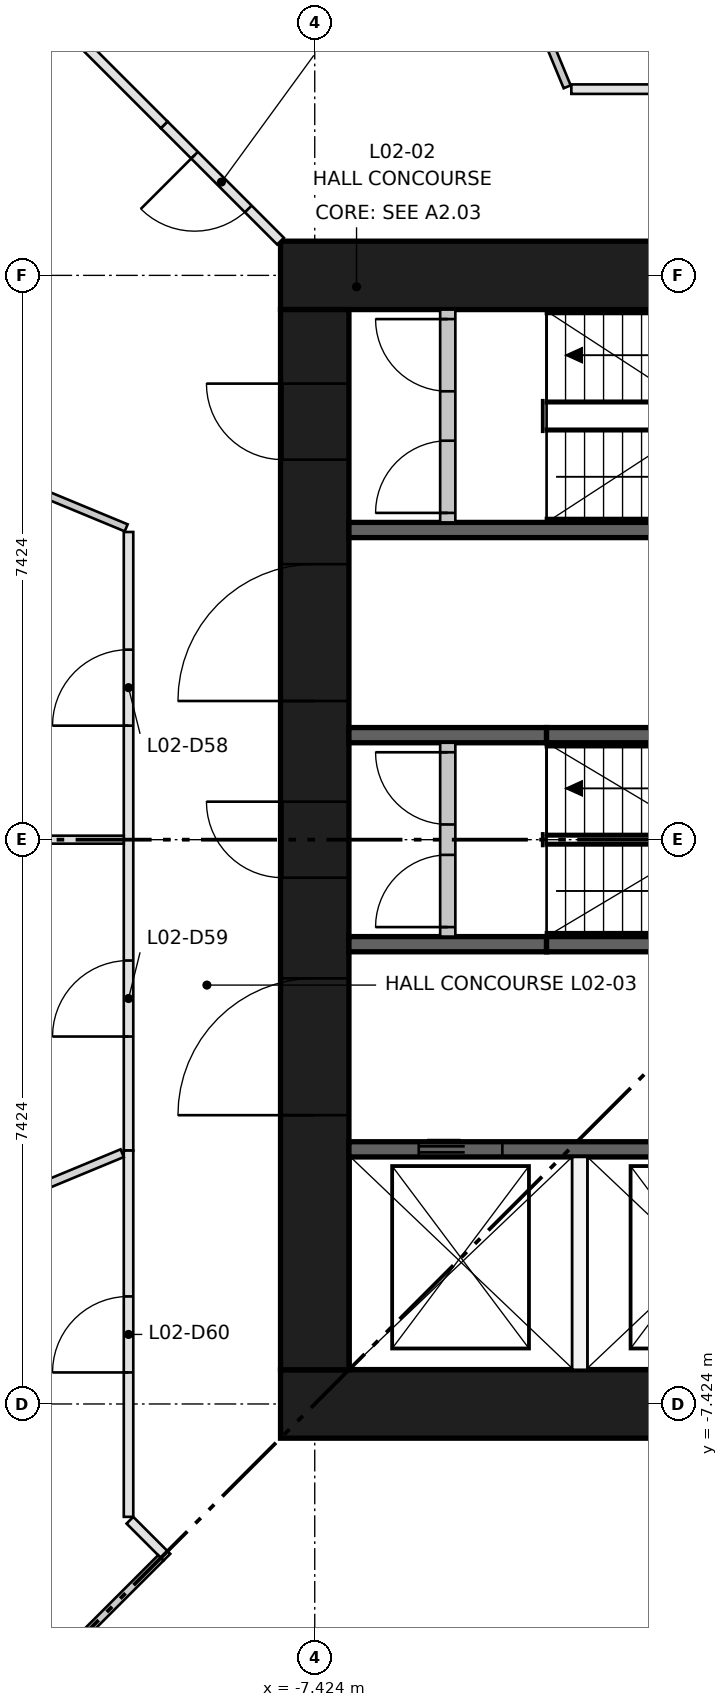
"""IFC4 building model, lengths in metres.
Left out: names, types, materials, properties, quantities, classifications, styles, units other than length and angle.
Written with IfcOpenShell. Run it as: python <this file> out.ifc"""

import sys

from ifc_helpers import new_model, si_unit, direction, frame, frame_2d, origin, place, context, subcontext, project, spatial, rectangle, extrude, element, fill, save


model = new_model("IFC4")
c1 = context("Model", 3, precision=1e-05, world=origin(), true_north=direction((0.0, 1.0)))
c2 = subcontext(c1, "Body", "Model", "MODEL_VIEW")
j1 = project(units=[si_unit("LENGTHUNIT", "METRE"), si_unit("PLANEANGLEUNIT", "RADIAN")], contexts=[c1])
p1 = place(None, origin())
s1 = spatial("IfcSite", under=j1, at=p1, CompositionType="ELEMENT")
p2 = place(p1, origin())
s2 = spatial("IfcBuilding", under=s1, at=p2, CompositionType="ELEMENT")
p3 = place(p2, frame((0.0, 0.0, 9.9)))
s3 = spatial("IfcBuildingStorey", under=s2, at=p3, CompositionType="ELEMENT", Elevation=9.9)
for number, where, z_axis, x_axis in (
    (1, (-7.874, -7.424, 0.0), (0.0, 0.0, 1.0), (1.0, 0.0, 0.0)),
    (2, (-7.874, 7.424, 0.0), (0.0, 0.0, 1.0), (1.0, 0.0, 0.0)),
):
    element("IfcWall", number, at=place(p3, frame(where, z_axis=z_axis, x_axis=x_axis)), inside=s3, PredefinedType="SHEAR", context=c2, shape_type="SweptSolid", body=[
        extrude(rectangle(XDim=15.748, YDim=0.9, at=frame_2d((7.874, 0.0))), origin(), (0.0, 0.0, 1.0), 4.5),
    ])
p4 = place(p3, frame((-7.424, -6.974, 0.0), z_axis=(0.0, 0.0, 1.0), x_axis=(0.0, 1.0, 0.0)))
e3 = element("IfcWall", 3, at=p4, inside=s3, PredefinedType="SHEAR", context=c2, shape_type="SweptSolid", body=[
    extrude(rectangle(XDim=13.948, YDim=0.9, at=frame_2d((6.974, 0.0))), origin(), (0.0, 0.0, 1.0), 4.5),
])
p5 = place(p4, frame((6.474, 0.0, 0.0)))
e4 = element("IfcOpeningElement", 4, at=p5, cuts=e3, PredefinedType="OPENING", context=c2, shape_type="SweptSolid", body=[
    extrude(rectangle(XDim=1.0, YDim=2.1, at=frame_2d((0.5, 1.05))), frame((0.0, 0.46, 0.0), z_axis=(0.0, -1.0, 0.0), x_axis=(1.0, 0.0, 0.0)), (0.0, 0.0, 1.0), 0.92),
])
p6 = place(p4, frame((3.35, 0.0, 0.0)))
e5 = element("IfcOpeningElement", 5, at=p6, cuts=e3, PredefinedType="OPENING", context=c2, shape_type="SweptSolid", body=[
    extrude(rectangle(XDim=1.8, YDim=2.1, at=frame_2d((0.9, 1.05))), frame((0.0, 0.46, 0.0), z_axis=(0.0, -1.0, 0.0), x_axis=(1.0, 0.0, 0.0)), (0.0, 0.0, 1.0), 0.92),
])
p7 = place(p4, frame((8.799, 0.0, 0.0)))
e6 = element("IfcOpeningElement", 6, at=p7, cuts=e3, PredefinedType="OPENING", context=c2, shape_type="SweptSolid", body=[
    extrude(rectangle(XDim=1.8, YDim=2.1, at=frame_2d((0.9, 1.05))), frame((0.0, 0.46, 0.0), z_axis=(0.0, -1.0, 0.0), x_axis=(1.0, 0.0, 0.0)), (0.0, 0.0, 1.0), 0.92),
])
p8 = place(p4, frame((11.974, 0.0, 0.0)))
e7 = element("IfcOpeningElement", 7, at=p8, cuts=e3, PredefinedType="OPENING", context=c2, shape_type="SweptSolid", body=[
    extrude(rectangle(XDim=1.0, YDim=2.1, at=frame_2d((0.5, 1.05))), frame((0.0, 0.46, 0.0), z_axis=(0.0, -1.0, 0.0), x_axis=(1.0, 0.0, 0.0)), (0.0, 0.0, 1.0), 0.92),
])
p9 = place(p3, frame((-6.974, -4.074, 0.0), z_axis=(0.0, 0.0, 1.0), x_axis=(1.0, 0.0, 0.0)))
e8 = element("IfcWall", 8, at=p9, inside=s3, PredefinedType="SHEAR", context=c2, shape_type="SweptSolid", body=[
    extrude(rectangle(XDim=13.948, YDim=0.2, at=frame_2d((6.974, 0.0))), origin(), (0.0, 0.0, 1.0), 4.1),
])
p10 = place(p9, frame((0.918, 0.0, 0.0)))
e9 = element("IfcOpeningElement", 9, at=p10, cuts=e8, PredefinedType="OPENING", context=c2, shape_type="SweptSolid", body=[
    extrude(rectangle(XDim=1.1, YDim=2.1, at=frame_2d((0.55, 1.05))), frame((0.0, 0.11, 0.0), z_axis=(0.0, -1.0, 0.0), x_axis=(1.0, 0.0, 0.0)), (0.0, 0.0, 1.0), 0.22),
])
p11 = place(p9, frame((4.055, 0.0, 0.0)))
e10 = element("IfcOpeningElement", 10, at=p11, cuts=e8, PredefinedType="OPENING", context=c2, shape_type="SweptSolid", body=[
    extrude(rectangle(XDim=1.1, YDim=2.1, at=frame_2d((0.55, 1.05))), frame((0.0, 0.11, 0.0), z_axis=(0.0, -1.0, 0.0), x_axis=(1.0, 0.0, 0.0)), (0.0, 0.0, 1.0), 0.22),
])
p12 = place(p9, frame((6.658, 0.0, 0.0)))
e11 = element("IfcOpeningElement", 11, at=p12, cuts=e8, PredefinedType="OPENING", context=c2, shape_type="SweptSolid", body=[
    extrude(rectangle(XDim=1.0, YDim=2.1, at=frame_2d((0.5, 1.05))), frame((0.0, 0.11, 0.0), z_axis=(0.0, -1.0, 0.0), x_axis=(1.0, 0.0, 0.0)), (0.0, 0.0, 1.0), 0.22),
])
p13 = place(p9, frame((8.627, 0.0, 0.0)))
e12 = element("IfcOpeningElement", 12, at=p13, cuts=e8, PredefinedType="OPENING", context=c2, shape_type="SweptSolid", body=[
    extrude(rectangle(XDim=1.0, YDim=2.1, at=frame_2d((0.5, 1.05))), frame((0.0, 0.11, 0.0), z_axis=(0.0, -1.0, 0.0), x_axis=(1.0, 0.0, 0.0)), (0.0, 0.0, 1.0), 0.22),
])
p14 = place(p9, frame((10.595, 0.0, 0.0)))
e13 = element("IfcOpeningElement", 13, at=p14, cuts=e8, PredefinedType="OPENING", context=c2, shape_type="SweptSolid", body=[
    extrude(rectangle(XDim=1.0, YDim=2.1, at=frame_2d((0.5, 1.05))), frame((0.0, 0.11, 0.0), z_axis=(0.0, -1.0, 0.0), x_axis=(1.0, 0.0, 0.0)), (0.0, 0.0, 1.0), 0.22),
])
p15 = place(p9, frame((12.564, 0.0, 0.0)))
e14 = element("IfcOpeningElement", 14, at=p15, cuts=e8, PredefinedType="OPENING", context=c2, shape_type="SweptSolid", body=[
    extrude(rectangle(XDim=1.0, YDim=2.1, at=frame_2d((0.5, 1.05))), frame((0.0, 0.11, 0.0), z_axis=(0.0, -1.0, 0.0), x_axis=(1.0, 0.0, 0.0)), (0.0, 0.0, 1.0), 0.22),
])
p16 = place(p3, frame((-6.974, 4.074, 0.0), z_axis=(0.0, 0.0, 1.0), x_axis=(1.0, 0.0, 0.0)))
e15 = element("IfcWall", 15, at=p16, inside=s3, PredefinedType="SHEAR", context=c2, shape_type="SweptSolid", body=[
    extrude(rectangle(XDim=6.974, YDim=0.2, at=frame_2d((3.487, 0.0))), origin(), (0.0, 0.0, 1.0), 4.1),
])
p17 = place(p3, frame((-6.974, -1.375, 0.0), z_axis=(0.0, 0.0, 1.0), x_axis=(1.0, 0.0, 0.0)))
e16 = element("IfcWall", 16, at=p17, inside=s3, PredefinedType="SHEAR", context=c2, shape_type="SweptSolid", body=[
    extrude(rectangle(XDim=2.6, YDim=0.2, at=frame_2d((1.3, 0.0))), origin(), (0.0, 0.0, 1.0), 4.1),
])
p18 = place(p3, frame((-4.374, -1.375, 0.0), z_axis=(0.0, 0.0, 1.0), x_axis=(1.0, 0.0, 0.0)))
e17 = element("IfcWall", 17, at=p18, inside=s3, PredefinedType="SHEAR", context=c2, shape_type="SweptSolid", body=[
    extrude(rectangle(XDim=4.374, YDim=0.2, at=frame_2d((2.187, 0.0))), origin(), (0.0, 0.0, 1.0), 4.1),
])
p19 = place(p3, frame((-6.974, 1.375, 0.0), z_axis=(0.0, 0.0, 1.0), x_axis=(1.0, 0.0, 0.0)))
e18 = element("IfcWall", 18, at=p19, inside=s3, PredefinedType="SHEAR", context=c2, shape_type="SweptSolid", body=[
    extrude(rectangle(XDim=2.6, YDim=0.2, at=frame_2d((1.3, 0.0))), origin(), (0.0, 0.0, 1.0), 4.1),
])
p20 = place(p3, frame((-4.374, 1.375, 0.0), z_axis=(0.0, 0.0, 1.0), x_axis=(1.0, 0.0, 0.0)))
e19 = element("IfcWall", 19, at=p20, inside=s3, PredefinedType="SHEAR", context=c2, shape_type="SweptSolid", body=[
    extrude(rectangle(XDim=4.374, YDim=0.2, at=frame_2d((2.187, 0.0))), origin(), (0.0, 0.0, 1.0), 4.1),
])
p21 = place(p3, frame((-3.937, -6.974, 0.0), z_axis=(0.0, 0.0, 1.0), x_axis=(0.0, 1.0, 0.0)))
e20 = element("IfcWall", 20, at=p21, inside=s3, PredefinedType="PARTITIONING", context=c2, shape_type="SweptSolid", body=[
    extrude(rectangle(XDim=2.8, YDim=0.2, at=frame_2d((1.4, 0.0))), origin(), (0.0, 0.0, 1.0), 4.1),
])
p22 = place(p3, frame((-5.674, -1.275, 0.0), z_axis=(0.0, 0.0, 1.0), x_axis=(0.0, 1.0, 0.0)))
e21 = element("IfcWall", 21, at=p22, inside=s3, PredefinedType="PARTITIONING", context=c2, shape_type="SweptSolid", body=[
    extrude(rectangle(XDim=2.55, YDim=0.2, at=frame_2d((1.275, 0.0))), origin(), (0.0, 0.0, 1.0), 4.1),
])
p23 = place(p22, frame((0.125, 0.0, 0.0)))
e22 = element("IfcOpeningElement", 22, at=p23, cuts=e21, PredefinedType="OPENING", context=c2, shape_type="SweptSolid", body=[
    extrude(rectangle(XDim=0.95, YDim=2.1, at=frame_2d((0.475, 1.05))), frame((0.0, 0.11, 0.0), z_axis=(0.0, -1.0, 0.0), x_axis=(1.0, 0.0, 0.0)), (0.0, 0.0, 1.0), 0.22),
])
p24 = place(p22, frame((1.475, 0.0, 0.0)))
e23 = element("IfcOpeningElement", 23, at=p24, cuts=e21, PredefinedType="OPENING", context=c2, shape_type="SweptSolid", body=[
    extrude(rectangle(XDim=0.95, YDim=2.1, at=frame_2d((0.475, 1.05))), frame((0.0, 0.11, 0.0), z_axis=(0.0, -1.0, 0.0), x_axis=(1.0, 0.0, 0.0)), (0.0, 0.0, 1.0), 0.22),
])
p25 = place(p3, frame((-5.674, 4.174, 0.0), z_axis=(0.0, 0.0, 1.0), x_axis=(0.0, 1.0, 0.0)))
e24 = element("IfcWall", 24, at=p25, inside=s3, PredefinedType="PARTITIONING", context=c2, shape_type="SweptSolid", body=[
    extrude(rectangle(XDim=2.8, YDim=0.2, at=frame_2d((1.4, 0.0))), origin(), (0.0, 0.0, 1.0), 4.1),
])
p26 = place(p25, frame((0.125, 0.0, 0.0)))
e25 = element("IfcOpeningElement", 25, at=p26, cuts=e24, PredefinedType="OPENING", context=c2, shape_type="SweptSolid", body=[
    extrude(rectangle(XDim=0.95, YDim=2.1, at=frame_2d((0.475, 1.05))), frame((0.0, 0.11, 0.0), z_axis=(0.0, -1.0, 0.0), x_axis=(1.0, 0.0, 0.0)), (0.0, 0.0, 1.0), 0.22),
])
p27 = place(p25, frame((1.725, 0.0, 0.0)))
e26 = element("IfcOpeningElement", 26, at=p27, cuts=e24, PredefinedType="OPENING", context=c2, shape_type="SweptSolid", body=[
    extrude(rectangle(XDim=0.95, YDim=2.1, at=frame_2d((0.475, 1.05))), frame((0.0, 0.11, 0.0), z_axis=(0.0, -1.0, 0.0), x_axis=(1.0, 0.0, 0.0)), (0.0, 0.0, 1.0), 0.22),
])
p28 = place(p3, frame((-7.874, 7.874, 0.0), z_axis=(0.0, 0.0, 1.0), x_axis=(-0.707106781187, 0.707106781187, 0.0)))
e27 = element("IfcWall", 27, at=p28, inside=s3, PredefinedType="PARTITIONING", context=c2, shape_type="SweptSolid", body=[
    extrude(rectangle(XDim=2.165, YDim=0.125, at=frame_2d((1.082, 0.0))), origin(), (0.0, 0.0, 1.0), 4.1),
])
p29 = place(p28, frame((0.6, 0.0, 0.0)))
e28 = element("IfcOpeningElement", 28, at=p29, cuts=e27, PredefinedType="OPENING", context=c2, shape_type="SweptSolid", body=[
    extrude(rectangle(XDim=1.0, YDim=2.1, at=frame_2d((0.5, 1.05))), frame((0.0, 0.073, 0.0), z_axis=(0.0, -1.0, 0.0), x_axis=(1.0, 0.0, 0.0)), (0.0, 0.0, 1.0), 0.145),
])
p30 = place(p3, frame((-4.048, 9.874, 0.0), z_axis=(0.0, 0.0, 1.0), x_axis=(1.0, 0.0, 0.0)))
e29 = element("IfcWall", 29, at=p30, inside=s3, PredefinedType="PARTITIONING", context=c2, shape_type="SweptSolid", body=[
    extrude(rectangle(XDim=4.048, YDim=0.125, at=frame_2d((2.024, 0.0))), origin(), (0.0, 0.0, 1.0), 4.1),
])
p31 = place(p30, frame((1.5, 0.0, 0.0)))
e30 = element("IfcOpeningElement", 30, at=p31, cuts=e29, PredefinedType="OPENING", context=c2, shape_type="SweptSolid", body=[
    extrude(rectangle(XDim=1.0, YDim=2.1, at=frame_2d((0.5, 1.05))), frame((0.0, 0.073, 0.0), z_axis=(0.0, -1.0, 0.0), x_axis=(1.0, 0.0, 0.0)), (0.0, 0.0, 1.0), 0.145),
])
p32 = place(p3, frame((-9.874, 0.0, 0.0), z_axis=(0.0, 0.0, 1.0), x_axis=(0.0, 1.0, 0.0)))
e31 = element("IfcWall", 31, at=p32, inside=s3, PredefinedType="PARTITIONING", context=c2, shape_type="SweptSolid", body=[
    extrude(rectangle(XDim=4.048, YDim=0.125, at=frame_2d((2.024, 0.0))), origin(), (0.0, 0.0, 1.0), 4.1),
])
p33 = place(p32, frame((1.5, 0.0, 0.0)))
e32 = element("IfcOpeningElement", 32, at=p33, cuts=e31, PredefinedType="OPENING", context=c2, shape_type="SweptSolid", body=[
    extrude(rectangle(XDim=1.0, YDim=2.1, at=frame_2d((0.5, 1.05))), frame((0.0, 0.073, 0.0), z_axis=(0.0, -1.0, 0.0), x_axis=(1.0, 0.0, 0.0)), (0.0, 0.0, 1.0), 0.145),
])
p34 = place(p3, frame((-9.874, -4.09, 0.0), z_axis=(0.0, 0.0, 1.0), x_axis=(0.0, 1.0, 0.0)))
e33 = element("IfcWall", 33, at=p34, inside=s3, PredefinedType="PARTITIONING", context=c2, shape_type="SweptSolid", body=[
    extrude(rectangle(XDim=4.09, YDim=0.125, at=frame_2d((2.045, 0.0))), origin(), (0.0, 0.0, 1.0), 4.1),
])
p35 = place(p34, frame((1.5, 0.0, 0.0)))
e34 = element("IfcOpeningElement", 34, at=p35, cuts=e33, PredefinedType="OPENING", context=c2, shape_type="SweptSolid", body=[
    extrude(rectangle(XDim=1.0, YDim=2.1, at=frame_2d((0.5, 1.05))), frame((0.0, 0.073, 0.0), z_axis=(0.0, -1.0, 0.0), x_axis=(1.0, 0.0, 0.0)), (0.0, 0.0, 1.0), 0.145),
])
p36 = place(p3, frame((-9.874, -8.909, 0.0), z_axis=(0.0, 0.0, 1.0), x_axis=(0.0, 1.0, 0.0)))
e35 = element("IfcWall", 35, at=p36, inside=s3, PredefinedType="PARTITIONING", context=c2, shape_type="SweptSolid", body=[
    extrude(rectangle(XDim=4.819, YDim=0.125, at=frame_2d((2.41, 0.0))), origin(), (0.0, 0.0, 1.0), 4.1),
])
p37 = place(p36, frame((1.9, 0.0, 0.0)))
e36 = element("IfcOpeningElement", 36, at=p37, cuts=e35, PredefinedType="OPENING", context=c2, shape_type="SweptSolid", body=[
    extrude(rectangle(XDim=1.0, YDim=2.1, at=frame_2d((0.5, 1.05))), frame((0.0, 0.073, 0.0), z_axis=(0.0, -1.0, 0.0), x_axis=(1.0, 0.0, 0.0)), (0.0, 0.0, 1.0), 0.145),
])
p38 = place(p3, frame((-9.369, -9.44, 0.0), z_axis=(0.0, 0.0, 1.0), x_axis=(-0.707106781187, 0.707106781187, 0.0)))
e37 = element("IfcWall", 37, at=p38, inside=s3, PredefinedType="PARTITIONING", context=c2, shape_type="SweptSolid", body=[
    extrude(rectangle(XDim=0.688, YDim=0.125, at=frame_2d((0.344, 0.0))), origin(), (0.0, 0.0, 1.0), 4.1),
])
p39 = place(p3, frame((-4.103, 9.905, 0.0), z_axis=(0.0, 0.0, 1.0), x_axis=(-0.38266385981, 0.923887639486, 0.0)))
e38 = element("IfcWall", 38, at=p39, inside=s3, PredefinedType="PARTITIONING", context=c2, shape_type="SweptSolid", body=[
    extrude(rectangle(XDim=4.399, YDim=0.1, at=frame_2d((2.199, 0.0))), origin(), (0.0, 0.0, 1.0), 4.1),
])
p40 = place(p3, frame((-9.405, 9.405, 0.0), z_axis=(0.0, 0.0, 1.0), x_axis=(-0.707106781187, 0.707106781187, 0.0)))
e39 = element("IfcWall", 39, at=p40, inside=s3, PredefinedType="PARTITIONING", context=c2, shape_type="SweptSolid", body=[
    extrude(rectangle(XDim=5.39, YDim=0.125, at=frame_2d((2.695, 0.0))), origin(), (0.0, 0.0, 1.0), 4.1),
])
p41 = place(p3, frame((-9.905, 4.103, 0.0), z_axis=(0.0, 0.0, 1.0), x_axis=(-0.923885444896, 0.382669158294, 0.0)))
e40 = element("IfcWall", 40, at=p41, inside=s3, PredefinedType="PARTITIONING", context=c2, shape_type="SweptSolid", body=[
    extrude(rectangle(XDim=4.099, YDim=0.1, at=frame_2d((2.05, 0.0))), origin(), (0.0, 0.0, 1.0), 4.1),
])
p42 = place(p3, frame((-9.937, 0.0, 0.0), z_axis=(0.0, 0.0, 1.0), x_axis=(-1.0, 0.0, 0.0)))
e41 = element("IfcWall", 41, at=p42, inside=s3, PredefinedType="PARTITIONING", context=c2, shape_type="SweptSolid", body=[
    extrude(rectangle(XDim=4.884, YDim=0.105, at=frame_2d((2.442, 0.0))), origin(), (0.0, 0.0, 1.0), 4.1),
])
p43 = place(p3, frame((-9.958, -4.125, 0.0), z_axis=(0.0, 0.0, 1.0), x_axis=(-0.923875488976, -0.382693194178, 0.0)))
e42 = element("IfcWall", 42, at=p43, inside=s3, PredefinedType="PARTITIONING", context=c2, shape_type="SweptSolid", body=[
    extrude(rectangle(XDim=4.042, YDim=0.11, at=frame_2d((2.021, 0.0))), origin(), (0.0, 0.0, 1.0), 4.1),
])
p44 = place(p3, frame((-13.216, -13.216, 0.0), z_axis=(0.0, 0.0, 1.0), x_axis=(0.707106781187, 0.707106781187, 0.0)))
e43 = element("IfcWall", 43, at=p44, inside=s3, PredefinedType="PARTITIONING", context=c2, shape_type="SweptSolid", body=[
    extrude(rectangle(XDim=5.327, YDim=0.1, at=frame_2d((2.664, 0.0))), origin(), (0.0, 0.0, 1.0), 4.1),
])
p45 = place(p10, origin())
e44 = element("IfcDoor", 44, at=p45, inside=s3, OperationType="DOUBLE_DOOR_SLIDING", PredefinedType="DOOR", context=c2, shape_type="SweptSolid", body=[
    extrude(rectangle(XDim=1.1, YDim=2.1, at=frame_2d((0.55, 1.05))), frame((0.0, 0.025, 0.0), z_axis=(0.0, -1.0, 0.0), x_axis=(1.0, 0.0, 0.0)), (0.0, 0.0, 1.0), 0.05),
])
fill(e9, e44)
p46 = place(p23, origin())
e45 = element("IfcDoor", 45, at=p46, inside=s3, OperationType="SINGLE_SWING_LEFT", PredefinedType="DOOR", context=c2, shape_type="SweptSolid", body=[
    extrude(rectangle(XDim=0.95, YDim=2.1, at=frame_2d((0.475, 1.05))), frame((0.0, 0.025, 0.0), z_axis=(0.0, -1.0, 0.0), x_axis=(1.0, 0.0, 0.0)), (0.0, 0.0, 1.0), 0.05),
])
fill(e22, e45)
p47 = place(p24, origin())
e46 = element("IfcDoor", 46, at=p47, inside=s3, OperationType="SINGLE_SWING_RIGHT", PredefinedType="DOOR", context=c2, shape_type="SweptSolid", body=[
    extrude(rectangle(XDim=0.95, YDim=2.1, at=frame_2d((0.475, 1.05))), frame((0.0, 0.025, 0.0), z_axis=(0.0, -1.0, 0.0), x_axis=(1.0, 0.0, 0.0)), (0.0, 0.0, 1.0), 0.05),
])
fill(e23, e46)
p48 = place(p26, origin())
e47 = element("IfcDoor", 47, at=p48, inside=s3, OperationType="SINGLE_SWING_LEFT", PredefinedType="DOOR", context=c2, shape_type="SweptSolid", body=[
    extrude(rectangle(XDim=0.95, YDim=2.1, at=frame_2d((0.475, 1.05))), frame((0.0, 0.025, 0.0), z_axis=(0.0, -1.0, 0.0), x_axis=(1.0, 0.0, 0.0)), (0.0, 0.0, 1.0), 0.05),
])
fill(e25, e47)
p49 = place(p27, origin())
e48 = element("IfcDoor", 48, at=p49, inside=s3, OperationType="SINGLE_SWING_RIGHT", PredefinedType="DOOR", context=c2, shape_type="SweptSolid", body=[
    extrude(rectangle(XDim=0.95, YDim=2.1, at=frame_2d((0.475, 1.05))), frame((0.0, 0.025, 0.0), z_axis=(0.0, -1.0, 0.0), x_axis=(1.0, 0.0, 0.0)), (0.0, 0.0, 1.0), 0.05),
])
fill(e26, e48)
p50 = place(p5, origin())
e49 = element("IfcDoor", 49, at=p50, inside=s3, OperationType="SINGLE_SWING_RIGHT", PredefinedType="DOOR", context=c2, shape_type="SweptSolid", body=[
    extrude(rectangle(XDim=1.0, YDim=2.1, at=frame_2d((0.5, 1.05))), frame((0.0, 0.45, 0.0), z_axis=(0.0, -1.0, 0.0), x_axis=(1.0, 0.0, 0.0)), (0.0, 0.0, 1.0), 0.05),
])
fill(e4, e49)
p51 = place(p6, origin())
e50 = element("IfcDoor", 50, at=p51, inside=s3, OperationType="DOUBLE_DOOR_SINGLE_SWING", PredefinedType="DOOR", context=c2, shape_type="SweptSolid", body=[
    extrude(rectangle(XDim=1.8, YDim=2.1, at=frame_2d((0.9, 1.05))), frame((0.0, 0.025, 0.0), z_axis=(0.0, -1.0, 0.0), x_axis=(1.0, 0.0, 0.0)), (0.0, 0.0, 1.0), 0.05),
])
fill(e5, e50)
p52 = place(p7, origin())
e51 = element("IfcDoor", 51, at=p52, inside=s3, OperationType="DOUBLE_DOOR_SINGLE_SWING", PredefinedType="DOOR", context=c2, shape_type="SweptSolid", body=[
    extrude(rectangle(XDim=1.8, YDim=2.1, at=frame_2d((0.9, 1.05))), frame((0.0, 0.025, 0.0), z_axis=(0.0, -1.0, 0.0), x_axis=(1.0, 0.0, 0.0)), (0.0, 0.0, 1.0), 0.05),
])
fill(e6, e51)
p53 = place(p8, origin())
e52 = element("IfcDoor", 52, at=p53, inside=s3, OperationType="SINGLE_SWING_RIGHT", PredefinedType="DOOR", context=c2, shape_type="SweptSolid", body=[
    extrude(rectangle(XDim=1.0, YDim=2.1, at=frame_2d((0.5, 1.05))), frame((0.0, 0.45, 0.0), z_axis=(0.0, -1.0, 0.0), x_axis=(1.0, 0.0, 0.0)), (0.0, 0.0, 1.0), 0.05),
])
fill(e7, e52)
p54 = place(p29, origin())
e53 = element("IfcDoor", 53, at=p54, inside=s3, OperationType="SINGLE_SWING_RIGHT", PredefinedType="DOOR", context=c2, shape_type="SweptSolid", body=[
    extrude(rectangle(XDim=1.0, YDim=2.1, at=frame_2d((0.5, 1.05))), frame((0.0, 0.025, 0.0), z_axis=(0.0, -1.0, 0.0), x_axis=(1.0, 0.0, 0.0)), (0.0, 0.0, 1.0), 0.05),
])
fill(e28, e53)
p55 = place(p33, origin())
e54 = element("IfcDoor", 54, at=p55, inside=s3, OperationType="SINGLE_SWING_LEFT", PredefinedType="DOOR", context=c2, shape_type="SweptSolid", body=[
    extrude(rectangle(XDim=1.0, YDim=2.1, at=frame_2d((0.5, 1.05))), frame((0.0, 0.025, 0.0), z_axis=(0.0, -1.0, 0.0), x_axis=(1.0, 0.0, 0.0)), (0.0, 0.0, 1.0), 0.05),
])
fill(e32, e54)
p56 = place(p35, origin())
e55 = element("IfcDoor", 55, at=p56, inside=s3, OperationType="SINGLE_SWING_LEFT", PredefinedType="DOOR", context=c2, shape_type="SweptSolid", body=[
    extrude(rectangle(XDim=1.0, YDim=2.1, at=frame_2d((0.5, 1.05))), frame((0.0, 0.025, 0.0), z_axis=(0.0, -1.0, 0.0), x_axis=(1.0, 0.0, 0.0)), (0.0, 0.0, 1.0), 0.05),
])
fill(e34, e55)
p57 = place(p37, origin())
e56 = element("IfcDoor", 56, at=p57, inside=s3, OperationType="SINGLE_SWING_LEFT", PredefinedType="DOOR", context=c2, shape_type="SweptSolid", body=[
    extrude(rectangle(XDim=1.0, YDim=2.1, at=frame_2d((0.5, 1.05))), frame((0.0, 0.025, 0.0), z_axis=(0.0, -1.0, 0.0), x_axis=(1.0, 0.0, 0.0)), (0.0, 0.0, 1.0), 0.05),
])
fill(e36, e56)
save(model, sys.argv[1])
